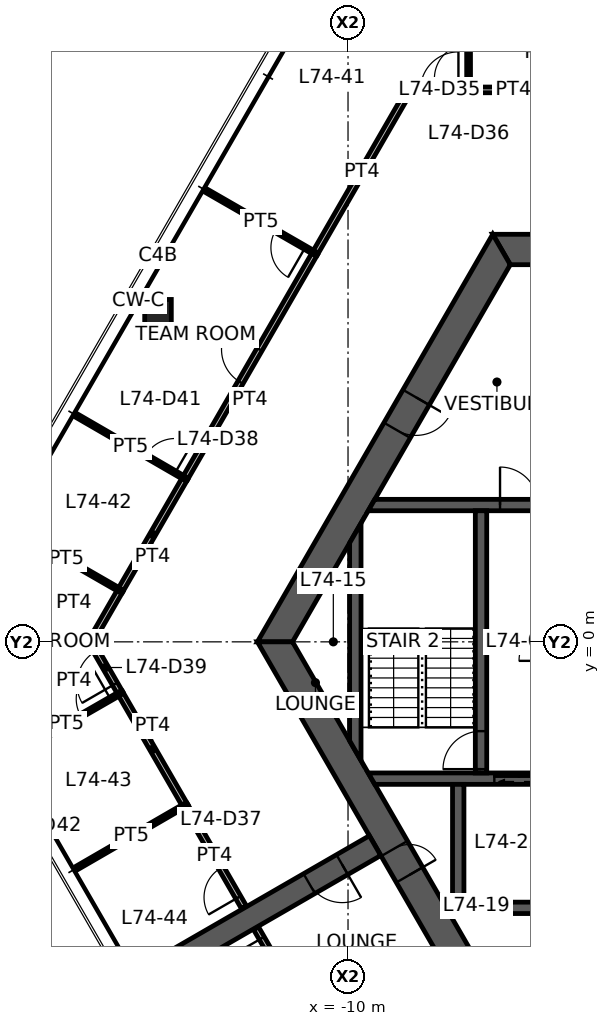
"""IFC4 building model, lengths in metres.
Left out: names, types, materials, properties, quantities, classifications, styles, units other than length and angle.
Written with IfcOpenShell. Run it as: python <this file> out.ifc"""

import sys

from ifc_helpers import new_model, si_unit, direction, frame, frame_2d, origin, origin_2d, place, context, subcontext, project, spatial, polyline, rectangle, hollow_rectangle, outline, extrude, element, fill, save


model = new_model("IFC4")
c1 = context("Model", 3, precision=1e-05, world=origin(), true_north=direction((0.0, 1.0)))
c2 = subcontext(c1, "Body", "Model", "MODEL_VIEW")
j1 = project(units=[si_unit("LENGTHUNIT", "METRE"), si_unit("PLANEANGLEUNIT", "RADIAN")], contexts=[c1])
p1 = place(None, origin())
s1 = spatial("IfcSite", under=j1, at=p1, CompositionType="ELEMENT")
p2 = place(p1, origin())
s2 = spatial("IfcBuilding", under=s1, at=p2, CompositionType="ELEMENT")
p3 = place(p2, frame((0.0, 0.0, 294.7)))
s3 = spatial("IfcBuildingStorey", under=s2, at=p3, CompositionType="ELEMENT", Elevation=294.7)
p4 = place(p3, frame((-15.0, 8.66, 0.0), z_axis=(0.0, 0.0, 1.0), x_axis=(1.0, 0.0, 0.0)))
e1 = element("IfcColumn", 1, at=p4, inside=s3, PredefinedType="COLUMN", context=c2, shape_type="SweptSolid", body=[
    extrude(hollow_rectangle(XDim=0.7, YDim=0.7, WallThickness=0.032, at=origin_2d()), origin(), (0.0, 0.0, 1.0), 3.9),
])
p5 = place(p3, frame((5.961, 10.325, 0.0), z_axis=(0.0, 0.0, 1.0), x_axis=(-1.0, 0.0, 0.0)))
e2 = element("IfcWall", 2, at=p5, inside=s3, PredefinedType="SHEAR", context=c2, shape_type="SweptSolid", body=[
    extrude(outline(polyline([(-0.231, -0.4), (4.636, -0.4), (5.536, -0.4), (6.386, -0.4), (7.286, -0.4), (12.153, -0.4), (11.691, 0.4), (7.286, 0.4), (6.386, 0.4), (5.536, 0.4), (4.636, 0.4), (0.231, 0.4), (-0.231, -0.4)])), origin(), (0.0, 0.0, 1.0), 3.9),
])
p6 = place(p5, frame((6.386, 0.0, 0.0)))
e3 = element("IfcOpeningElement", 3, at=p6, cuts=e2, PredefinedType="OPENING", context=c2, shape_type="SweptSolid", body=[
    extrude(rectangle(XDim=0.9, YDim=2.1, at=frame_2d((0.45, 1.05))), frame((0.0, 0.41, 0.0), z_axis=(0.0, -1.0, 0.0), x_axis=(1.0, 0.0, 0.0)), (0.0, 0.0, 1.0), 0.82),
])
p7 = place(p5, frame((4.636, 0.0, 0.0)))
e4 = element("IfcOpeningElement", 4, at=p7, cuts=e2, PredefinedType="OPENING", context=c2, shape_type="SweptSolid", body=[
    extrude(rectangle(XDim=0.9, YDim=2.1, at=frame_2d((0.45, 1.05))), frame((0.0, 0.41, 0.0), z_axis=(0.0, -1.0, 0.0), x_axis=(1.0, 0.0, 0.0)), (0.0, 0.0, 1.0), 0.82),
])
p8 = place(p3, frame((-5.961, 10.325, 0.0), z_axis=(0.0, 0.0, 1.0), x_axis=(-0.500004296715, -0.866022923061, 0.0)))
e5 = element("IfcWall", 5, at=p8, inside=s3, PredefinedType="SHEAR", context=c2, shape_type="SweptSolid", body=[
    extrude(outline(polyline([(-0.231, -0.4), (4.494, -0.4), (5.494, -0.4), (12.153, -0.4), (11.691, 0.4), (5.494, 0.4), (4.494, 0.4), (0.231, 0.4), (-0.231, -0.4)])), origin(), (0.0, 0.0, 1.0), 3.9),
])
p9 = place(p8, frame((4.494, 0.0, 0.0)))
e6 = element("IfcOpeningElement", 6, at=p9, cuts=e5, PredefinedType="OPENING", context=c2, shape_type="SweptSolid", body=[
    extrude(rectangle(XDim=1.0, YDim=2.1, at=frame_2d((0.5, 1.05))), frame((0.0, 0.41, 0.0), z_axis=(0.0, -1.0, 0.0), x_axis=(1.0, 0.0, 0.0)), (0.0, 0.0, 1.0), 0.82),
])
p10 = place(p3, frame((-11.922, 0.0, 0.0), z_axis=(0.0, 0.0, 1.0), x_axis=(0.500004296715, -0.866022923061, 0.0)))
e7 = element("IfcWall", 7, at=p10, inside=s3, PredefinedType="SHEAR", context=c2, shape_type="SweptSolid", body=[
    extrude(outline(polyline([(-0.231, -0.4), (6.281, -0.4), (7.081, -0.4), (12.153, -0.4), (11.691, 0.4), (7.081, 0.4), (6.281, 0.4), (0.231, 0.4), (-0.231, -0.4)])), origin(), (0.0, 0.0, 1.0), 3.9),
])
p11 = place(p10, frame((6.281, 0.0, 0.0)))
e8 = element("IfcOpeningElement", 8, at=p11, cuts=e7, PredefinedType="OPENING", context=c2, shape_type="SweptSolid", body=[
    extrude(rectangle(XDim=0.8, YDim=2.1, at=frame_2d((0.4, 1.05))), frame((0.0, 0.41, 0.0), z_axis=(0.0, -1.0, 0.0), x_axis=(1.0, 0.0, 0.0)), (0.0, 0.0, 1.0), 0.82),
])
p12 = place(p3, frame((-9.288, -5.363, 0.0), z_axis=(0.0, 0.0, 1.0), x_axis=(-0.866027473358, -0.499996415376, 0.0)))
e9 = element("IfcWall", 9, at=p12, inside=s3, PredefinedType="SHEAR", context=c2, shape_type="SweptSolid", body=[
    extrude(rectangle(XDim=7.045, YDim=0.6, at=frame_2d((3.523, 0.0))), origin(), (0.0, 0.0, 1.0), 3.9),
])
p13 = place(p12, frame((1.0, 0.0, 0.0)))
e10 = element("IfcOpeningElement", 10, at=p13, cuts=e9, PredefinedType="OPENING", context=c2, shape_type="SweptSolid", body=[
    extrude(rectangle(XDim=1.0, YDim=2.1, at=frame_2d((0.5, 1.05))), frame((0.0, 0.31, 0.0), z_axis=(0.0, -1.0, 0.0), x_axis=(1.0, 0.0, 0.0)), (0.0, 0.0, 1.0), 0.62),
])
p14 = place(p3, frame((-9.382, 3.6, 0.0), z_axis=(0.0, 0.0, 1.0), x_axis=(1.0, 0.0, 0.0)))
e11 = element("IfcWall", 11, at=p14, inside=s3, PredefinedType="SHEAR", context=c2, shape_type="SweptSolid", body=[
    extrude(outline(polyline([(-0.087, -0.15), (3.382, -0.15), (4.382, -0.15), (5.782, -0.15), (6.882, -0.15), (7.932, -0.15), (7.932, 0.15), (6.882, 0.15), (5.782, 0.15), (4.382, 0.15), (3.382, 0.15), (0.087, 0.15), (-0.087, -0.15)])), origin(), (0.0, 0.0, 1.0), 3.9),
])
p15 = place(p14, frame((3.382, 0.0, 0.0)))
e12 = element("IfcOpeningElement", 12, at=p15, cuts=e11, PredefinedType="OPENING", context=c2, shape_type="SweptSolid", body=[
    extrude(rectangle(XDim=1.0, YDim=2.1, at=frame_2d((0.5, 1.05))), frame((0.0, 0.16, 0.0), z_axis=(0.0, -1.0, 0.0), x_axis=(1.0, 0.0, 0.0)), (0.0, 0.0, 1.0), 0.32),
])
p16 = place(p14, frame((5.782, 0.0, 0.0)))
e13 = element("IfcOpeningElement", 13, at=p16, cuts=e11, PredefinedType="OPENING", context=c2, shape_type="SweptSolid", body=[
    extrude(rectangle(XDim=1.1, YDim=2.1, at=frame_2d((0.55, 1.05))), frame((0.0, 0.16, 0.0), z_axis=(0.0, -1.0, 0.0), x_axis=(1.0, 0.0, 0.0)), (0.0, 0.0, 1.0), 0.32),
])
p17 = place(p3, frame((-9.382, -3.6, 0.0), z_axis=(0.0, 0.0, 1.0), x_axis=(1.0, 0.0, 0.0)))
e14 = element("IfcWall", 14, at=p17, inside=s3, PredefinedType="SHEAR", context=c2, shape_type="SweptSolid", body=[
    extrude(outline(polyline([(0.087, -0.15), (3.232, -0.15), (4.532, -0.15), (5.782, -0.15), (6.882, -0.15), (7.932, -0.15), (7.932, 0.15), (6.882, 0.15), (5.782, 0.15), (4.532, 0.15), (3.232, 0.15), (-0.087, 0.15), (0.087, -0.15)])), origin(), (0.0, 0.0, 1.0), 3.9),
])
p18 = place(p17, frame((5.782, 0.0, 0.0)))
e15 = element("IfcOpeningElement", 15, at=p18, cuts=e14, PredefinedType="OPENING", context=c2, shape_type="SweptSolid", body=[
    extrude(rectangle(XDim=1.1, YDim=2.1, at=frame_2d((0.55, 1.05))), frame((0.0, 0.16, 0.0), z_axis=(0.0, -1.0, 0.0), x_axis=(1.0, 0.0, 0.0)), (0.0, 0.0, 1.0), 0.32),
])
p19 = place(p17, frame((3.232, 0.0, 0.0)))
e16 = element("IfcOpeningElement", 16, at=p19, cuts=e14, PredefinedType="OPENING", context=c2, shape_type="SweptSolid", body=[
    extrude(rectangle(XDim=1.3, YDim=2.1, at=frame_2d((0.65, 1.05))), frame((0.0, 0.16, 0.0), z_axis=(0.0, -1.0, 0.0), x_axis=(1.0, 0.0, 0.0)), (0.0, 0.0, 1.0), 0.32),
])
p20 = place(p3, frame((-6.5, -3.45, 0.0), z_axis=(0.0, 0.0, 1.0), x_axis=(0.0, 1.0, 0.0)))
e17 = element("IfcWall", 17, at=p20, inside=s3, PredefinedType="SHEAR", context=c2, shape_type="SweptSolid", body=[
    extrude(rectangle(XDim=6.9, YDim=0.3, at=frame_2d((3.45, 0.0))), origin(), (0.0, 0.0, 1.0), 3.9),
])
p21 = place(p20, frame((0.1, 0.0, 0.0)))
e18 = element("IfcOpeningElement", 18, at=p21, cuts=e17, PredefinedType="OPENING", context=c2, shape_type="SweptSolid", body=[
    extrude(rectangle(XDim=1.0, YDim=2.1, at=frame_2d((0.5, 1.05))), frame((0.0, 0.16, 0.0), z_axis=(0.0, -1.0, 0.0), x_axis=(1.0, 0.0, 0.0)), (0.0, 0.0, 1.0), 0.32),
])
p22 = place(p3, frame((-7.25, -7.0, 0.0), z_axis=(0.0, 0.0, 1.0), x_axis=(1.0, 0.0, 0.0)))
e19 = element("IfcWall", 19, at=p22, inside=s3, PredefinedType="SHEAR", context=c2, shape_type="SweptSolid", body=[
    extrude(rectangle(XDim=2.6, YDim=0.3, at=frame_2d((1.3, 0.0))), origin(), (0.0, 0.0, 1.0), 3.9),
])
p23 = place(p3, frame((-7.1, -3.75, 0.0), z_axis=(0.0, 0.0, 1.0), x_axis=(0.0, -1.0, 0.0)))
e20 = element("IfcWall", 20, at=p23, inside=s3, PredefinedType="SHEAR", context=c2, shape_type="SweptSolid", body=[
    extrude(rectangle(XDim=3.1, YDim=0.3, at=frame_2d((1.55, 0.0))), origin(), (0.0, 0.0, 1.0), 3.9),
])
p24 = place(p3, frame((-9.808, -2.862, 0.0), z_axis=(0.0, 0.0, 1.0), x_axis=(0.0, 1.0, 0.0)))
e21 = element("IfcWall", 21, at=p24, inside=s3, PredefinedType="SHEAR", context=c2, shape_type="SweptSolid", body=[
    extrude(outline(polyline([(-0.26, -0.15), (5.984, -0.15), (5.465, 0.15), (0.26, 0.15), (-0.26, -0.15)])), origin(), (0.0, 0.0, 1.0), 3.9),
])
p25 = place(p3, frame((-6.836, 14.525, 0.0), z_axis=(0.0, 0.0, 1.0), x_axis=(1.0, 0.0, 0.0)))
e22 = element("IfcWall", 22, at=p25, inside=s3, PredefinedType="PARTITIONING", context=c2, shape_type="SweptSolid", body=[
    extrude(rectangle(XDim=2.376, YDim=0.15, at=frame_2d((1.188, 0.0))), origin(), (0.0, 0.0, 1.0), 2.95),
])
p26 = place(p3, frame((-8.363, 14.525, 0.0), z_axis=(0.0, 0.0, 1.0), x_axis=(1.0, 0.0, 0.0)))
e23 = element("IfcWall", 23, at=p26, inside=s3, PredefinedType="PARTITIONING", context=c2, shape_type="SweptSolid", body=[
    extrude(rectangle(XDim=1.536, YDim=0.15, at=frame_2d((0.768, 0.0))), origin(), (0.0, 0.0, 1.0), 2.95),
])
p27 = place(p26, frame((0.268, 0.0, 0.0)))
e24 = element("IfcOpeningElement", 24, at=p27, cuts=e23, PredefinedType="OPENING", context=c2, shape_type="SweptSolid", body=[
    extrude(rectangle(XDim=1.0, YDim=2.1, at=frame_2d((0.5, 1.05))), frame((0.0, 0.085, 0.0), z_axis=(0.0, -1.0, 0.0), x_axis=(1.0, 0.0, 0.0)), (0.0, 0.0, 1.0), 0.17),
])
p28 = place(p3, frame((-6.826, 14.525, 0.0), z_axis=(0.0, 0.0, 1.0), x_axis=(-0.001401178566, 0.999999018349, 0.0)))
e25 = element("IfcWall", 25, at=p28, inside=s3, PredefinedType="PARTITIONING", context=c2, shape_type="SweptSolid", body=[
    extrude(rectangle(XDim=3.311, YDim=0.1, at=frame_2d((1.655, 0.0))), origin(), (0.0, 0.0, 1.0), 2.95),
])
p29 = place(p28, frame((0.3, 0.0, 0.0)))
e26 = element("IfcOpeningElement", 26, at=p29, cuts=e25, PredefinedType="OPENING", context=c2, shape_type="SweptSolid", body=[
    extrude(rectangle(XDim=0.9, YDim=2.1, at=frame_2d((0.45, 1.05))), frame((0.0, 0.06, 0.0), z_axis=(0.0, -1.0, 0.0), x_axis=(1.0, 0.0, 0.0)), (0.0, 0.0, 1.0), 0.12),
])
p30 = place(p3, frame((-10.874, 10.216, 0.0), z_axis=(0.0, 0.0, 1.0), x_axis=(0.499988457423, 0.866032067792, 0.0)))
e27 = element("IfcWall", 27, at=p30, inside=s3, PredefinedType="PARTITIONING", context=c2, shape_type="SweptSolid", body=[
    extrude(rectangle(XDim=4.952, YDim=0.15, at=frame_2d((2.476, 0.0))), origin(), (0.0, 0.0, 1.0), 2.95),
])
for number, where, z_axis, x_axis in (
    (28, (-15.997, 1.342, 0.0), (0.0, 0.0, 1.0), (0.5, 0.866, 0.0)),
    (29, (-14.284, -4.309, 0.0), (0.0, 0.0, 1.0), (-0.5, 0.866, 0.0)),
):
    element("IfcWall", number, at=place(p3, frame(where, z_axis=z_axis, x_axis=x_axis)), inside=s3, PredefinedType="PARTITIONING", context=c2, shape_type="SweptSolid", body=[
        extrude(rectangle(XDim=3.426, YDim=0.15, at=frame_2d((1.713, 0.0))), origin(), (0.0, 0.0, 1.0), 2.95),
    ])
p31 = place(p3, frame((-12.739, -6.985, 0.0), z_axis=(0.0, 0.0, 1.0), x_axis=(-0.500017819788, 0.86601511528, 0.0)))
e30 = element("IfcWall", 30, at=p31, inside=s3, PredefinedType="PARTITIONING", context=c2, shape_type="SweptSolid", body=[
    extrude(rectangle(XDim=3.101, YDim=0.15, at=frame_2d((1.55, 0.0))), origin(), (0.0, 0.0, 1.0), 2.95),
])
p32 = place(p31, frame((0.3, 0.0, 0.0)))
e31 = element("IfcOpeningElement", 31, at=p32, cuts=e30, PredefinedType="OPENING", context=c2, shape_type="SweptSolid", body=[
    extrude(rectangle(XDim=0.9, YDim=2.1, at=frame_2d((0.45, 1.05))), frame((0.0, 0.085, 0.0), z_axis=(0.0, -1.0, 0.0), x_axis=(1.0, 0.0, 0.0)), (0.0, 0.0, 1.0), 0.17),
])
p33 = place(p3, frame((-14.289, 4.301, 0.0), z_axis=(0.0, 0.0, 1.0), x_axis=(0.500020088259, 0.866013805512, 0.0)))
e32 = element("IfcWall", 32, at=p33, inside=s3, PredefinedType="PARTITIONING", context=c2, shape_type="SweptSolid", body=[
    extrude(rectangle(XDim=6.84, YDim=0.15, at=frame_2d((3.42, 0.0))), origin(), (0.0, 0.0, 1.0), 2.95),
])
p34 = place(p33, frame((2.92, 0.0, 0.0)))
e33 = element("IfcOpeningElement", 33, at=p34, cuts=e32, PredefinedType="OPENING", context=c2, shape_type="SweptSolid", body=[
    extrude(rectangle(XDim=1.0, YDim=2.1, at=frame_2d((0.5, 1.05))), frame((0.0, 0.085, 0.0), z_axis=(0.0, -1.0, 0.0), x_axis=(1.0, 0.0, 0.0)), (0.0, 0.0, 1.0), 0.17),
])
p35 = place(p3, frame((-16.772, 0.0, 0.0), z_axis=(0.0, 0.0, 1.0), x_axis=(0.500011542666, 0.866018739521, 0.0)))
e34 = element("IfcWall", 34, at=p35, inside=s3, PredefinedType="PARTITIONING", context=c2, shape_type="SweptSolid", body=[
    extrude(rectangle(XDim=1.56, YDim=0.15, at=frame_2d((0.78, 0.0))), origin(), (0.0, 0.0, 1.0), 2.95),
])
p36 = place(p3, frame((-15.992, -1.351, 0.0), z_axis=(0.0, 0.0, 1.0), x_axis=(-0.500011542666, 0.866018739521, 0.0)))
e35 = element("IfcWall", 35, at=p36, inside=s3, PredefinedType="PARTITIONING", context=c2, shape_type="SweptSolid", body=[
    extrude(rectangle(XDim=1.56, YDim=0.15, at=frame_2d((0.78, 0.0))), origin(), (0.0, 0.0, 1.0), 2.95),
])
p37 = place(p36, frame((0.28, 0.0, 0.0)))
e36 = element("IfcOpeningElement", 36, at=p37, cuts=e35, PredefinedType="OPENING", context=c2, shape_type="SweptSolid", body=[
    extrude(rectangle(XDim=1.0, YDim=2.1, at=frame_2d((0.5, 1.05))), frame((0.0, 0.085, 0.0), z_axis=(0.0, -1.0, 0.0), x_axis=(1.0, 0.0, 0.0)), (0.0, 0.0, 1.0), 0.17),
])
p38 = place(p3, frame((-10.869, 10.224, 0.0), z_axis=(0.0, 0.0, 1.0), x_axis=(-0.866757761015, 0.498729369218, 0.0)))
e37 = element("IfcWall", 37, at=p38, inside=s3, PredefinedType="PARTITIONING", context=c2, shape_type="SweptSolid", body=[
    extrude(rectangle(XDim=3.286, YDim=0.1, at=frame_2d((1.643, 0.0))), origin(), (0.0, 0.0, 1.0), 2.95),
])
p39 = place(p38, frame((0.3, 0.0, 0.0)))
e38 = element("IfcOpeningElement", 38, at=p39, cuts=e37, PredefinedType="OPENING", context=c2, shape_type="SweptSolid", body=[
    extrude(rectangle(XDim=0.9, YDim=2.1, at=frame_2d((0.45, 1.05))), frame((0.0, 0.06, 0.0), z_axis=(0.0, -1.0, 0.0), x_axis=(1.0, 0.0, 0.0)), (0.0, 0.0, 1.0), 0.12),
])
p40 = place(p3, frame((-17.154, 5.96, 0.0), z_axis=(0.0, 0.0, 1.0), x_axis=(0.865342122637, -0.501181614577, 0.0)))
e39 = element("IfcWall", 39, at=p40, inside=s3, PredefinedType="PARTITIONING", context=c2, shape_type="SweptSolid", body=[
    extrude(rectangle(XDim=3.311, YDim=0.1, at=frame_2d((1.655, 0.0))), origin(), (0.0, 0.0, 1.0), 2.95),
])
p41 = place(p40, frame((2.111, 0.0, 0.0)))
e40 = element("IfcOpeningElement", 40, at=p41, cuts=e39, PredefinedType="OPENING", context=c2, shape_type="SweptSolid", body=[
    extrude(rectangle(XDim=0.9, YDim=2.1, at=frame_2d((0.45, 1.05))), frame((0.0, 0.06, 0.0), z_axis=(0.0, -1.0, 0.0), x_axis=(1.0, 0.0, 0.0)), (0.0, 0.0, 1.0), 0.12),
])
p42 = place(p3, frame((-15.992, 1.351, 0.0), z_axis=(0.0, 0.0, 1.0), x_axis=(-0.866707153418, 0.498817311462, 0.0)))
e41 = element("IfcWall", 41, at=p42, inside=s3, PredefinedType="PARTITIONING", context=c2, shape_type="SweptSolid", body=[
    extrude(rectangle(XDim=3.286, YDim=0.1, at=frame_2d((1.643, 0.0))), origin(), (0.0, 0.0, 1.0), 2.95),
])
p43 = place(p3, frame((-14.289, -4.3, 0.0), z_axis=(0.0, 0.0, 1.0), x_axis=(-0.865245913684, -0.501347692578, 0.0)))
e42 = element("IfcWall", 42, at=p43, inside=s3, PredefinedType="PARTITIONING", context=c2, shape_type="SweptSolid", body=[
    extrude(rectangle(XDim=3.275, YDim=0.1, at=frame_2d((1.638, 0.0))), origin(), (0.0, 0.0, 1.0), 2.95),
])
p44 = place(p3, frame((-18.84, -2.99, 0.0), z_axis=(0.0, 0.0, 1.0), x_axis=(0.866707153418, 0.498817311462, 0.0)))
e43 = element("IfcWall", 43, at=p44, inside=s3, PredefinedType="PARTITIONING", context=c2, shape_type="SweptSolid", body=[
    extrude(rectangle(XDim=3.286, YDim=0.1, at=frame_2d((1.643, 0.0))), origin(), (0.0, 0.0, 1.0), 2.95),
])
p45 = place(p44, frame((2.086, 0.0, 0.0)))
e44 = element("IfcOpeningElement", 44, at=p45, cuts=e43, PredefinedType="OPENING", context=c2, shape_type="SweptSolid", body=[
    extrude(rectangle(XDim=0.9, YDim=2.1, at=frame_2d((0.45, 1.05))), frame((0.0, 0.06, 0.0), z_axis=(0.0, -1.0, 0.0), x_axis=(1.0, 0.0, 0.0)), (0.0, 0.0, 1.0), 0.12),
])
p46 = place(p3, frame((-10.869, -10.225, 0.0), z_axis=(0.0, 0.0, 1.0), x_axis=(-0.499958760481, 0.866049212123, 0.0)))
e45 = element("IfcWall", 45, at=p46, inside=s3, PredefinedType="PARTITIONING", context=c2, shape_type="SweptSolid", body=[
    extrude(rectangle(XDim=3.1, YDim=0.15, at=frame_2d((1.55, 0.0))), origin(), (0.0, 0.0, 1.0), 2.95),
])
p47 = place(p46, frame((1.9, 0.0, 0.0)))
e46 = element("IfcOpeningElement", 46, at=p47, cuts=e45, PredefinedType="OPENING", context=c2, shape_type="SweptSolid", body=[
    extrude(rectangle(XDim=0.9, YDim=2.1, at=frame_2d((0.45, 1.05))), frame((0.0, 0.085, 0.0), z_axis=(0.0, -1.0, 0.0), x_axis=(1.0, 0.0, 0.0)), (0.0, 0.0, 1.0), 0.17),
])
p48 = place(p11, origin())
e47 = element("IfcDoor", 47, at=p48, inside=s3, OperationType="SINGLE_SWING_RIGHT", PredefinedType="DOOR", context=c2, shape_type="SweptSolid", body=[
    extrude(rectangle(XDim=0.8, YDim=2.1, at=frame_2d((0.4, 1.05))), frame((0.0, 0.025, 0.0), z_axis=(0.0, -1.0, 0.0), x_axis=(1.0, 0.0, 0.0)), (0.0, 0.0, 1.0), 0.05),
])
fill(e8, e47)
p49 = place(p9, origin())
e48 = element("IfcDoor", 48, at=p49, inside=s3, OperationType="SINGLE_SWING_LEFT", PredefinedType="DOOR", context=c2, shape_type="SweptSolid", body=[
    extrude(rectangle(XDim=1.0, YDim=2.1, at=frame_2d((0.5, 1.05))), frame((0.0, 0.025, 0.0), z_axis=(0.0, -1.0, 0.0), x_axis=(1.0, 0.0, 0.0)), (0.0, 0.0, 1.0), 0.05),
])
fill(e6, e48)
p50 = place(p21, origin())
e49 = element("IfcDoor", 49, at=p50, inside=s3, OperationType="SINGLE_SWING_LEFT", PredefinedType="DOOR", context=c2, shape_type="SweptSolid", body=[
    extrude(rectangle(XDim=1.0, YDim=2.1, at=frame_2d((0.5, 1.05))), frame((0.0, 0.025, 0.0), z_axis=(0.0, -1.0, 0.0), x_axis=(1.0, 0.0, 0.0)), (0.0, 0.0, 1.0), 0.05),
])
fill(e18, e49)
p51 = place(p15, origin())
e50 = element("IfcDoor", 50, at=p51, inside=s3, OperationType="SINGLE_SWING_LEFT", PredefinedType="DOOR", context=c2, shape_type="SweptSolid", body=[
    extrude(rectangle(XDim=1.0, YDim=2.1, at=frame_2d((0.5, 1.05))), frame((0.0, 0.025, 0.0), z_axis=(0.0, -1.0, 0.0), x_axis=(1.0, 0.0, 0.0)), (0.0, 0.0, 1.0), 0.05),
])
fill(e12, e50)
p52 = place(p13, origin())
e51 = element("IfcDoor", 51, at=p52, inside=s3, OperationType="SINGLE_SWING_LEFT", PredefinedType="DOOR", context=c2, shape_type="SweptSolid", body=[
    extrude(rectangle(XDim=1.0, YDim=2.1, at=frame_2d((0.5, 1.05))), frame((0.0, 0.025, 0.0), z_axis=(0.0, -1.0, 0.0), x_axis=(1.0, 0.0, 0.0)), (0.0, 0.0, 1.0), 0.05),
])
fill(e10, e51)
p53 = place(p27, origin())
e52 = element("IfcDoor", 52, at=p53, inside=s3, OperationType="SINGLE_SWING_RIGHT", PredefinedType="DOOR", context=c2, shape_type="SweptSolid", body=[
    extrude(rectangle(XDim=1.0, YDim=2.1, at=frame_2d((0.5, 1.05))), frame((0.0, 0.025, 0.0), z_axis=(0.0, -1.0, 0.0), x_axis=(1.0, 0.0, 0.0)), (0.0, 0.0, 1.0), 0.05),
])
fill(e24, e52)
p54 = place(p29, origin())
e53 = element("IfcDoor", 53, at=p54, inside=s3, OperationType="SINGLE_SWING_LEFT", PredefinedType="DOOR", context=c2, shape_type="SweptSolid", body=[
    extrude(rectangle(XDim=0.9, YDim=2.1, at=frame_2d((0.45, 1.05))), frame((0.0, 0.025, 0.0), z_axis=(0.0, -1.0, 0.0), x_axis=(1.0, 0.0, 0.0)), (0.0, 0.0, 1.0), 0.05),
])
fill(e26, e53)
p55 = place(p32, origin())
e54 = element("IfcDoor", 54, at=p55, inside=s3, OperationType="SINGLE_SWING_LEFT", PredefinedType="DOOR", context=c2, shape_type="SweptSolid", body=[
    extrude(rectangle(XDim=0.9, YDim=2.1, at=frame_2d((0.45, 1.05))), frame((0.0, 0.025, 0.0), z_axis=(0.0, -1.0, 0.0), x_axis=(1.0, 0.0, 0.0)), (0.0, 0.0, 1.0), 0.05),
])
fill(e31, e54)
p56 = place(p34, origin())
e55 = element("IfcDoor", 55, at=p56, inside=s3, OperationType="SINGLE_SWING_RIGHT", PredefinedType="DOOR", context=c2, shape_type="SweptSolid", body=[
    extrude(rectangle(XDim=1.0, YDim=2.1, at=frame_2d((0.5, 1.05))), frame((0.0, 0.025, 0.0), z_axis=(0.0, -1.0, 0.0), x_axis=(1.0, 0.0, 0.0)), (0.0, 0.0, 1.0), 0.05),
])
fill(e33, e55)
p57 = place(p37, origin())
e56 = element("IfcDoor", 56, at=p57, inside=s3, OperationType="SINGLE_SWING_LEFT", PredefinedType="DOOR", context=c2, shape_type="SweptSolid", body=[
    extrude(rectangle(XDim=1.0, YDim=2.1, at=frame_2d((0.5, 1.05))), frame((0.0, 0.025, 0.0), z_axis=(0.0, -1.0, 0.0), x_axis=(1.0, 0.0, 0.0)), (0.0, 0.0, 1.0), 0.05),
])
fill(e36, e56)
p58 = place(p39, origin())
e57 = element("IfcDoor", 57, at=p58, inside=s3, OperationType="SINGLE_SWING_LEFT", PredefinedType="DOOR", context=c2, shape_type="SweptSolid", body=[
    extrude(rectangle(XDim=0.9, YDim=2.1, at=frame_2d((0.45, 1.05))), frame((0.0, 0.025, 0.0), z_axis=(0.0, -1.0, 0.0), x_axis=(1.0, 0.0, 0.0)), (0.0, 0.0, 1.0), 0.05),
])
fill(e38, e57)
p59 = place(p41, origin())
e58 = element("IfcDoor", 58, at=p59, inside=s3, OperationType="SINGLE_SWING_RIGHT", PredefinedType="DOOR", context=c2, shape_type="SweptSolid", body=[
    extrude(rectangle(XDim=0.9, YDim=2.1, at=frame_2d((0.45, 1.05))), frame((0.0, 0.025, 0.0), z_axis=(0.0, -1.0, 0.0), x_axis=(1.0, 0.0, 0.0)), (0.0, 0.0, 1.0), 0.05),
])
fill(e40, e58)
p60 = place(p45, origin())
e59 = element("IfcDoor", 59, at=p60, inside=s3, OperationType="SINGLE_SWING_RIGHT", PredefinedType="DOOR", context=c2, shape_type="SweptSolid", body=[
    extrude(rectangle(XDim=0.9, YDim=2.1, at=frame_2d((0.45, 1.05))), frame((0.0, 0.025, 0.0), z_axis=(0.0, -1.0, 0.0), x_axis=(1.0, 0.0, 0.0)), (0.0, 0.0, 1.0), 0.05),
])
fill(e44, e59)
p61 = place(p47, origin())
e60 = element("IfcDoor", 60, at=p61, inside=s3, OperationType="SINGLE_SWING_RIGHT", PredefinedType="DOOR", context=c2, shape_type="SweptSolid", body=[
    extrude(rectangle(XDim=0.9, YDim=2.1, at=frame_2d((0.45, 1.05))), frame((0.0, 0.025, 0.0), z_axis=(0.0, -1.0, 0.0), x_axis=(1.0, 0.0, 0.0)), (0.0, 0.0, 1.0), 0.05),
])
fill(e46, e60)
p62 = place(p19, origin())
e61 = element("IfcDoor", 61, at=p62, inside=s3, OperationType="DOUBLE_DOOR_SLIDING", PredefinedType="DOOR", context=c2, shape_type="SweptSolid", body=[
    extrude(rectangle(XDim=1.3, YDim=2.1, at=frame_2d((0.65, 1.05))), frame((0.0, 0.025, 0.0), z_axis=(0.0, -1.0, 0.0), x_axis=(1.0, 0.0, 0.0)), (0.0, 0.0, 1.0), 0.05),
])
fill(e16, e61)
save(model, sys.argv[1])
